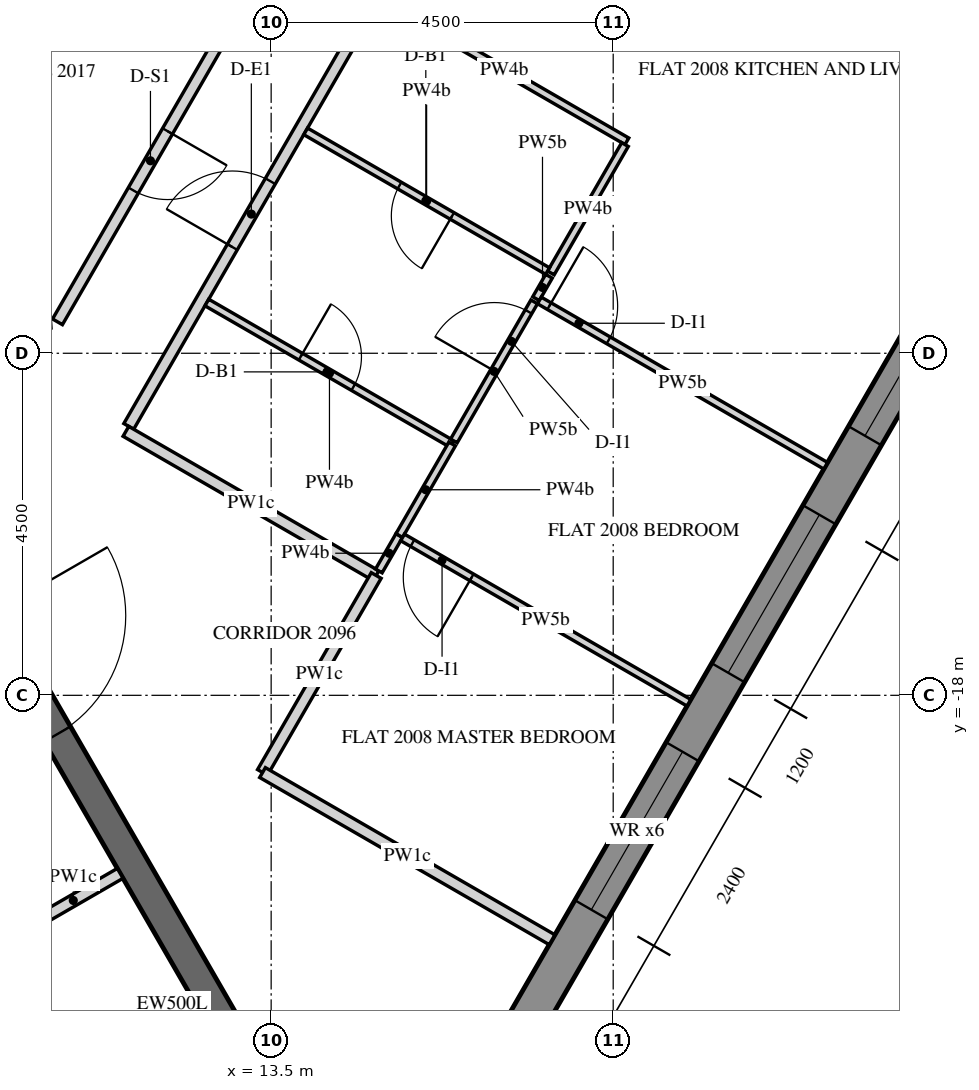
"""IFC4 building model, lengths in metres.
Left out: names, types, materials, properties, quantities, classifications, styles, units other than length and angle.
Written with IfcOpenShell. Run it as: python <this file> out.ifc"""

import sys

from ifc_helpers import new_model, si_unit, direction, frame, frame_2d, origin, place, context, subcontext, project, spatial, polyline, rectangle, outline, extrude, element, fill, save


model = new_model("IFC4")
c1 = context("Model", 3, precision=1e-05, world=origin(), true_north=direction((0.0, 1.0)))
c2 = subcontext(c1, "Body", "Model", "MODEL_VIEW")
j1 = project(units=[si_unit("LENGTHUNIT", "METRE"), si_unit("PLANEANGLEUNIT", "RADIAN")], contexts=[c1])
p1 = place(None, origin())
s1 = spatial("IfcSite", under=j1, at=p1, CompositionType="ELEMENT")
p2 = place(p1, origin())
s2 = spatial("IfcBuilding", under=s1, at=p2, CompositionType="ELEMENT")
p3 = place(p2, frame((0.0, 0.0, 260.1)))
s3 = spatial("IfcBuildingStorey", under=s2, at=p3, CompositionType="ELEMENT", Elevation=260.1)
p4 = place(p3, frame((16.451, -23.005, -0.15), z_axis=(0.0, 0.0, 1.0), x_axis=(0.500003737743, 0.866023245787, 0.0)))
e1 = element("IfcWall", 1, at=p4, inside=s3, PredefinedType="SOLIDWALL", context=c2, shape_type="SweptSolid", body=[
    extrude(outline(polyline([(-0.021, -0.25), (25.468, -0.25), (25.421, 0.25), (0.021, 0.25), (-0.021, -0.25)])), origin(), (0.0, 0.0, 1.0), 3.9),
])
p5 = place(p4, frame((2.522, 0.0, 0.75)))
e2 = element("IfcOpeningElement", 2, at=p5, cuts=e1, PredefinedType="OPENING", context=c2, shape_type="SweptSolid", body=[
    extrude(rectangle(XDim=2.4, YDim=2.7, at=frame_2d((1.2, 1.35))), frame((0.0, 0.26, 0.0), z_axis=(0.0, -1.0, 0.0), x_axis=(1.0, 0.0, 0.0)), (0.0, 0.0, 1.0), 0.52),
])
p6 = place(p4, frame((6.122, 0.0, 0.75)))
e3 = element("IfcOpeningElement", 3, at=p6, cuts=e1, PredefinedType="OPENING", context=c2, shape_type="SweptSolid", body=[
    extrude(rectangle(XDim=2.4, YDim=2.7, at=frame_2d((1.2, 1.35))), frame((0.0, 0.26, 0.0), z_axis=(0.0, -1.0, 0.0), x_axis=(1.0, 0.0, 0.0)), (0.0, 0.0, 1.0), 0.52),
])
p7 = place(p4, frame((9.722, 0.0, 0.75)))
e4 = element("IfcOpeningElement", 4, at=p7, cuts=e1, PredefinedType="OPENING", context=c2, shape_type="SweptSolid", body=[
    extrude(rectangle(XDim=2.4, YDim=2.7, at=frame_2d((1.2, 1.35))), frame((0.0, 0.26, 0.0), z_axis=(0.0, -1.0, 0.0), x_axis=(1.0, 0.0, 0.0)), (0.0, 0.0, 1.0), 0.52),
])
p8 = place(p4, frame((13.323, 0.0, 0.75)))
e5 = element("IfcOpeningElement", 5, at=p8, cuts=e1, PredefinedType="OPENING", context=c2, shape_type="SweptSolid", body=[
    extrude(rectangle(XDim=2.4, YDim=2.7, at=frame_2d((1.2, 1.35))), frame((0.0, 0.26, 0.0), z_axis=(0.0, -1.0, 0.0), x_axis=(1.0, 0.0, 0.0)), (0.0, 0.0, 1.0), 0.52),
])
p9 = place(p4, frame((16.922, 0.0, 0.75)))
e6 = element("IfcOpeningElement", 6, at=p9, cuts=e1, PredefinedType="OPENING", context=c2, shape_type="SweptSolid", body=[
    extrude(rectangle(XDim=2.4, YDim=2.7, at=frame_2d((1.2, 1.35))), frame((0.0, 0.26, 0.0), z_axis=(0.0, -1.0, 0.0), x_axis=(1.0, 0.0, 0.0)), (0.0, 0.0, 1.0), 0.52),
])
p10 = place(p4, frame((20.522, 0.0, 0.75)))
e7 = element("IfcOpeningElement", 7, at=p10, cuts=e1, PredefinedType="OPENING", context=c2, shape_type="SweptSolid", body=[
    extrude(rectangle(XDim=2.4, YDim=2.7, at=frame_2d((1.2, 1.35))), frame((0.0, 0.26, 0.0), z_axis=(0.0, -1.0, 0.0), x_axis=(1.0, 0.0, 0.0)), (0.0, 0.0, 1.0), 0.52),
])
p11 = place(p3, frame((6.235, -10.8, -0.15), z_axis=(0.0, 0.0, 1.0), x_axis=(0.499996419489, 0.866027470984, 0.0)))
e8 = element("IfcWall", 8, at=p11, inside=s3, PredefinedType="SHEAR", context=c2, shape_type="SweptSolid", body=[
    extrude(outline(polyline([(-0.115, -0.2), (12.586, -0.2), (12.355, 0.2), (0.115, 0.2), (-0.115, -0.2)])), origin(), (0.0, 0.0, 1.0), 3.9),
])
p12 = place(p11, frame((5.364, 0.0, 0.15)))
e9 = element("IfcOpeningElement", 9, at=p12, cuts=e8, PredefinedType="OPENING", context=c2, shape_type="SweptSolid", body=[
    extrude(rectangle(XDim=1.8, YDim=2.4, at=frame_2d((0.9, 1.2))), frame((0.0, 0.21, 0.0), z_axis=(0.0, -1.0, 0.0), x_axis=(1.0, 0.0, 0.0)), (0.0, 0.0, 1.0), 0.42),
])
p13 = place(p3, frame((6.351, -11.0, -0.15), z_axis=(0.0, 0.0, 1.0), x_axis=(0.499998894578, -0.866026041999, 0.0)))
e10 = element("IfcWall", 10, at=p13, inside=s3, PredefinedType="SHEAR", context=c2, shape_type="SweptSolid", body=[
    extrude(rectangle(XDim=15.544, YDim=0.4, at=frame_2d((7.772, 0.0))), origin(), (0.0, 0.0, 1.0), 3.9),
])
p14 = place(p13, frame((6.872, 0.0, 0.15)))
e11 = element("IfcOpeningElement", 11, at=p14, cuts=e10, PredefinedType="OPENING", context=c2, shape_type="SweptSolid", body=[
    extrude(rectangle(XDim=1.8, YDim=2.4, at=frame_2d((0.9, 1.2))), frame((0.0, 0.21, 0.0), z_axis=(0.0, -1.0, 0.0), x_axis=(1.0, 0.0, 0.0)), (0.0, 0.0, 1.0), 0.42),
])
p15 = place(p3, frame((10.28, -21.055, 0.0), z_axis=(0.0, 0.0, 1.0), x_axis=(0.866020080793, 0.500009219579, 0.0)))
e12 = element("IfcWall", 12, at=p15, inside=s3, PredefinedType="PARTITIONING", context=c2, shape_type="SweptSolid", body=[
    extrude(rectangle(XDim=1.425, YDim=0.15, at=frame_2d((0.712, 0.0))), origin(), (0.0, 0.0, 1.0), 2.823),
])
p16 = place(p3, frame((11.627, -14.462, 0.0), z_axis=(0.0, 0.0, 1.0), x_axis=(0.499994634027, 0.866028501808, 0.0)))
e13 = element("IfcWall", 13, at=p16, inside=s3, PredefinedType="PARTITIONING", context=c2, shape_type="SweptSolid", body=[
    extrude(rectangle(XDim=15.296, YDim=0.15, at=frame_2d((7.648, 0.0))), origin(), (0.0, 0.0, 1.0), 2.823),
])
p17 = place(p16, frame((2.725, 0.0, 0.0)))
e14 = element("IfcOpeningElement", 14, at=p17, cuts=e13, PredefinedType="OPENING", context=c2, shape_type="SweptSolid", body=[
    extrude(rectangle(XDim=1.0, YDim=2.1, at=frame_2d((0.5, 1.05))), frame((0.0, 0.085, 0.0), z_axis=(0.0, -1.0, 0.0), x_axis=(1.0, 0.0, 0.0)), (0.0, 0.0, 1.0), 0.17),
])
p18 = place(p16, frame((13.936, 0.0, 0.0)))
e15 = element("IfcOpeningElement", 15, at=p18, cuts=e13, PredefinedType="OPENING", context=c2, shape_type="SweptSolid", body=[
    extrude(rectangle(XDim=1.0, YDim=2.1, at=frame_2d((0.5, 1.05))), frame((0.0, 0.085, 0.0), z_axis=(0.0, -1.0, 0.0), x_axis=(1.0, 0.0, 0.0)), (0.0, 0.0, 1.0), 0.17),
])
p19 = place(p3, frame((14.88, -16.427, 0.0), z_axis=(0.0, 0.0, 1.0), x_axis=(-0.86601654697, 0.500015340139, 0.0)))
e16 = element("IfcWall", 16, at=p19, inside=s3, PredefinedType="PARTITIONING", context=c2, shape_type="SweptSolid", body=[
    extrude(rectangle(XDim=3.8, YDim=0.15, at=frame_2d((1.9, 0.0))), origin(), (0.0, 0.0, 1.0), 2.823),
])
p20 = place(p3, frame((13.386, -19.014, 0.0), z_axis=(0.0, 0.0, 1.0), x_axis=(0.500009728207, 0.866019787128, 0.0)))
e17 = element("IfcWall", 17, at=p20, inside=s3, PredefinedType="PARTITIONING", context=c2, shape_type="SweptSolid", body=[
    extrude(rectangle(XDim=2.992, YDim=0.15, at=frame_2d((1.496, 0.0))), origin(), (0.0, 0.0, 1.0), 2.823),
])
p21 = place(p3, frame((17.196, -21.216, 0.0), z_axis=(0.0, 0.0, 1.0), x_axis=(-0.866010893236, 0.500025132165, 0.0)))
e18 = element("IfcWall", 18, at=p21, inside=s3, PredefinedType="PARTITIONING", context=c2, shape_type="SweptSolid", body=[
    extrude(rectangle(XDim=4.399, YDim=0.15, at=frame_2d((2.199, 0.0))), origin(), (0.0, 0.0, 1.0), 2.823),
])
p22 = place(p3, frame((13.135, -8.849, 0.0), z_axis=(0.0, 0.0, 1.0), x_axis=(-0.500024829938, -0.866011067739, 0.0)))
e19 = element("IfcWall", 19, at=p22, inside=s3, PredefinedType="PARTITIONING", context=c2, shape_type="SweptSolid", body=[
    extrude(rectangle(XDim=4.892, YDim=0.15, at=frame_2d((2.446, 0.0))), origin(), (0.0, 0.0, 1.0), 2.823),
])
p23 = place(p22, frame((1.996, 0.0, 0.0)))
e20 = element("IfcOpeningElement", 20, at=p23, cuts=e19, PredefinedType="OPENING", context=c2, shape_type="SweptSolid", body=[
    extrude(rectangle(XDim=0.9, YDim=2.1, at=frame_2d((0.45, 1.05))), frame((0.0, 0.085, 0.0), z_axis=(0.0, -1.0, 0.0), x_axis=(1.0, 0.0, 0.0)), (0.0, 0.0, 1.0), 0.17),
])
p24 = place(p3, frame((17.155, -12.487, 0.0), z_axis=(0.0, 0.0, 1.0), x_axis=(-0.499681137129, -0.866209421097, 0.0)))
e21 = element("IfcWall", 21, at=p24, inside=s3, PredefinedType="PARTITIONING", context=c2, shape_type="SweptSolid", body=[
    extrude(rectangle(XDim=0.341, YDim=0.1, at=frame_2d((0.17, 0.0))), origin(), (0.0, 0.0, 1.0), 2.823),
])
p25 = place(p3, frame((17.029, -12.805, 0.0), z_axis=(0.0, 0.0, 1.0), x_axis=(0.866027639635, -0.499996127374, 0.0)))
e22 = element("IfcWall", 22, at=p25, inside=s3, PredefinedType="PARTITIONING", context=c2, shape_type="SweptSolid", body=[
    extrude(rectangle(XDim=4.35, YDim=0.1, at=frame_2d((2.175, 0.0))), origin(), (0.0, 0.0, 1.0), 2.823),
])
p26 = place(p25, frame((0.15, 0.0, 0.0)))
e23 = element("IfcOpeningElement", 23, at=p26, cuts=e22, PredefinedType="OPENING", context=c2, shape_type="SweptSolid", body=[
    extrude(rectangle(XDim=0.9, YDim=2.1, at=frame_2d((0.45, 1.05))), frame((0.0, 0.06, 0.0), z_axis=(0.0, -1.0, 0.0), x_axis=(1.0, 0.0, 0.0)), (0.0, 0.0, 1.0), 0.12),
])
p27 = place(p3, frame((14.954, -8.849, 0.0), z_axis=(0.0, 0.0, 1.0), x_axis=(0.866028424924, -0.499994767197, 0.0)))
e24 = element("IfcWall", 24, at=p27, inside=s3, PredefinedType="PARTITIONING", context=c2, shape_type="SweptSolid", body=[
    extrude(rectangle(XDim=3.725, YDim=0.1, at=frame_2d((1.863, 0.0))), origin(), (0.0, 0.0, 1.0), 2.823),
])
p28 = place(p3, frame((18.155, -10.754, 0.0), z_axis=(0.0, 0.0, 1.0), x_axis=(-0.49989585183, -0.866085525409, 0.0)))
e25 = element("IfcWall", 25, at=p28, inside=s3, PredefinedType="PARTITIONING", context=c2, shape_type="SweptSolid", body=[
    extrude(rectangle(XDim=1.95, YDim=0.1, at=frame_2d((0.975, 0.0))), origin(), (0.0, 0.0, 1.0), 2.823),
])
p29 = place(p3, frame((12.654, -12.833, 0.0), z_axis=(0.0, 0.0, 1.0), x_axis=(0.866056803351, -0.499945610411, 0.0)))
e26 = element("IfcWall", 26, at=p29, inside=s3, PredefinedType="PARTITIONING", context=c2, shape_type="SweptSolid", body=[
    extrude(rectangle(XDim=3.725, YDim=0.1, at=frame_2d((1.863, 0.0))), origin(), (0.0, 0.0, 1.0), 2.823),
])
p30 = place(p29, frame((1.425, 0.0, 0.0)))
e27 = element("IfcOpeningElement", 27, at=p30, cuts=e26, PredefinedType="OPENING", context=c2, shape_type="SweptSolid", body=[
    extrude(rectangle(XDim=0.8, YDim=2.1, at=frame_2d((0.4, 1.05))), frame((0.0, 0.06, 0.0), z_axis=(0.0, -1.0, 0.0), x_axis=(1.0, 0.0, 0.0)), (0.0, 0.0, 1.0), 0.12),
])
p31 = place(p3, frame((15.904, -14.653, 0.0), z_axis=(0.0, 0.0, 1.0), x_axis=(0.499979177903, 0.866037425094, 0.0)))
e28 = element("IfcWall", 28, at=p31, inside=s3, PredefinedType="PARTITIONING", context=c2, shape_type="SweptSolid", body=[
    extrude(rectangle(XDim=2.113, YDim=0.1, at=frame_2d((1.056, 0.0))), origin(), (0.0, 0.0, 1.0), 2.823),
])
p32 = place(p31, frame((1.063, 0.0, 0.0)))
e29 = element("IfcOpeningElement", 29, at=p32, cuts=e28, PredefinedType="OPENING", context=c2, shape_type="SweptSolid", body=[
    extrude(rectangle(XDim=0.9, YDim=2.1, at=frame_2d((0.45, 1.05))), frame((0.0, 0.06, 0.0), z_axis=(0.0, -1.0, 0.0), x_axis=(1.0, 0.0, 0.0)), (0.0, 0.0, 1.0), 0.12),
])
p33 = place(p3, frame((17.137, -12.418, 0.0), z_axis=(0.0, 0.0, 1.0), x_axis=(-0.866035129944, 0.499983153418, 0.0)))
e30 = element("IfcWall", 30, at=p33, inside=s3, PredefinedType="PARTITIONING", context=c2, shape_type="SweptSolid", body=[
    extrude(rectangle(XDim=3.675, YDim=0.1, at=frame_2d((1.837, 0.0))), origin(), (0.0, 0.0, 1.0), 2.823),
])
p34 = place(p33, frame((1.45, 0.0, 0.0)))
e31 = element("IfcOpeningElement", 31, at=p34, cuts=e30, PredefinedType="OPENING", context=c2, shape_type="SweptSolid", body=[
    extrude(rectangle(XDim=0.8, YDim=2.1, at=frame_2d((0.4, 1.05))), frame((0.0, 0.06, 0.0), z_axis=(0.0, -1.0, 0.0), x_axis=(1.0, 0.0, 0.0)), (0.0, 0.0, 1.0), 0.12),
])
p35 = place(p3, frame((14.917, -16.364, 0.0), z_axis=(0.0, 0.0, 1.0), x_axis=(0.500141487433, 0.865943700565, 0.0)))
e32 = element("IfcWall", 32, at=p35, inside=s3, PredefinedType="PARTITIONING", context=c2, shape_type="SweptSolid", body=[
    extrude(rectangle(XDim=0.538, YDim=0.1, at=frame_2d((0.269, 0.0))), origin(), (0.0, 0.0, 1.0), 2.823),
])
p36 = place(p3, frame((15.186, -15.898, 0.0), z_axis=(0.0, 0.0, 1.0), x_axis=(0.4999705729, 0.866042392862, 0.0)))
e33 = element("IfcWall", 33, at=p36, inside=s3, PredefinedType="PARTITIONING", context=c2, shape_type="SweptSolid", body=[
    extrude(rectangle(XDim=1.391, YDim=0.1, at=frame_2d((0.696, 0.0))), origin(), (0.0, 0.0, 1.0), 2.823),
])
p37 = place(p3, frame((18.996, -18.098, 0.0), z_axis=(0.0, 0.0, 1.0), x_axis=(-0.866027639635, 0.499996127374, 0.0)))
e34 = element("IfcWall", 34, at=p37, inside=s3, PredefinedType="PARTITIONING", context=c2, shape_type="SweptSolid", body=[
    extrude(rectangle(XDim=4.35, YDim=0.1, at=frame_2d((2.175, 0.0))), origin(), (0.0, 0.0, 1.0), 2.823),
])
p38 = place(p37, frame((3.3, 0.0, 0.0)))
e35 = element("IfcOpeningElement", 35, at=p38, cuts=e34, PredefinedType="OPENING", context=c2, shape_type="SweptSolid", body=[
    extrude(rectangle(XDim=0.9, YDim=2.1, at=frame_2d((0.45, 1.05))), frame((0.0, 0.06, 0.0), z_axis=(0.0, -1.0, 0.0), x_axis=(1.0, 0.0, 0.0)), (0.0, 0.0, 1.0), 0.12),
])
p39 = place(p5, frame((0.0, 0.18, 0.0)))
e36 = element("IfcWindow", 36, at=p39, inside=s3, PartitioningType="DOUBLE_PANEL_VERTICAL", PredefinedType="WINDOW", context=c2, shape_type="SweptSolid", body=[
    extrude(rectangle(XDim=2.4, YDim=2.7, at=frame_2d((1.2, 1.35))), frame((0.0, 0.03, 0.0), z_axis=(0.0, -1.0, 0.0), x_axis=(1.0, 0.0, 0.0)), (0.0, 0.0, 1.0), 0.06),
])
fill(e2, e36)
p40 = place(p6, frame((0.0, 0.18, 0.0)))
e37 = element("IfcWindow", 37, at=p40, inside=s3, PartitioningType="DOUBLE_PANEL_VERTICAL", PredefinedType="WINDOW", context=c2, shape_type="SweptSolid", body=[
    extrude(rectangle(XDim=2.4, YDim=2.7, at=frame_2d((1.2, 1.35))), frame((0.0, 0.03, 0.0), z_axis=(0.0, -1.0, 0.0), x_axis=(1.0, 0.0, 0.0)), (0.0, 0.0, 1.0), 0.06),
])
fill(e3, e37)
p41 = place(p7, frame((0.0, 0.18, 0.0)))
e38 = element("IfcWindow", 38, at=p41, inside=s3, PartitioningType="DOUBLE_PANEL_VERTICAL", PredefinedType="WINDOW", context=c2, shape_type="SweptSolid", body=[
    extrude(rectangle(XDim=2.4, YDim=2.7, at=frame_2d((1.2, 1.35))), frame((0.0, 0.03, 0.0), z_axis=(0.0, -1.0, 0.0), x_axis=(1.0, 0.0, 0.0)), (0.0, 0.0, 1.0), 0.06),
])
fill(e4, e38)
p42 = place(p14, origin())
e39 = element("IfcDoor", 39, at=p42, inside=s3, OperationType="DOUBLE_DOOR_SINGLE_SWING", PredefinedType="DOOR", context=c2, shape_type="SweptSolid", body=[
    extrude(rectangle(XDim=1.8, YDim=2.4, at=frame_2d((0.9, 1.2))), frame((0.0, 0.025, 0.0), z_axis=(0.0, -1.0, 0.0), x_axis=(1.0, 0.0, 0.0)), (0.0, 0.0, 1.0), 0.05),
])
fill(e11, e39)
p43 = place(p17, origin())
e40 = element("IfcDoor", 40, at=p43, inside=s3, OperationType="SINGLE_SWING_LEFT", PredefinedType="DOOR", context=c2, shape_type="SweptSolid", body=[
    extrude(rectangle(XDim=1.0, YDim=2.1, at=frame_2d((0.5, 1.05))), frame((0.0, 0.025, 0.0), z_axis=(0.0, -1.0, 0.0), x_axis=(1.0, 0.0, 0.0)), (0.0, 0.0, 1.0), 0.05),
])
fill(e14, e40)
p44 = place(p30, origin())
e41 = element("IfcDoor", 41, at=p44, inside=s3, OperationType="SINGLE_SWING_RIGHT", PredefinedType="DOOR", context=c2, shape_type="SweptSolid", body=[
    extrude(rectangle(XDim=0.8, YDim=2.1, at=frame_2d((0.4, 1.05))), frame((0.0, 0.025, 0.0), z_axis=(0.0, -1.0, 0.0), x_axis=(1.0, 0.0, 0.0)), (0.0, 0.0, 1.0), 0.05),
])
fill(e27, e41)
p45 = place(p32, origin())
e42 = element("IfcDoor", 42, at=p45, inside=s3, OperationType="SINGLE_SWING_RIGHT", PredefinedType="DOOR", context=c2, shape_type="SweptSolid", body=[
    extrude(rectangle(XDim=0.9, YDim=2.1, at=frame_2d((0.45, 1.05))), frame((0.0, 0.025, 0.0), z_axis=(0.0, -1.0, 0.0), x_axis=(1.0, 0.0, 0.0)), (0.0, 0.0, 1.0), 0.05),
])
fill(e29, e42)
p46 = place(p38, origin())
e43 = element("IfcDoor", 43, at=p46, inside=s3, OperationType="SINGLE_SWING_RIGHT", PredefinedType="DOOR", context=c2, shape_type="SweptSolid", body=[
    extrude(rectangle(XDim=0.9, YDim=2.1, at=frame_2d((0.45, 1.05))), frame((0.0, 0.025, 0.0), z_axis=(0.0, -1.0, 0.0), x_axis=(1.0, 0.0, 0.0)), (0.0, 0.0, 1.0), 0.05),
])
fill(e35, e43)
p47 = place(p26, origin())
e44 = element("IfcDoor", 44, at=p47, inside=s3, OperationType="SINGLE_SWING_RIGHT", PredefinedType="DOOR", context=c2, shape_type="SweptSolid", body=[
    extrude(rectangle(XDim=0.9, YDim=2.1, at=frame_2d((0.45, 1.05))), frame((0.0, 0.025, 0.0), z_axis=(0.0, -1.0, 0.0), x_axis=(1.0, 0.0, 0.0)), (0.0, 0.0, 1.0), 0.05),
])
fill(e23, e44)
p48 = place(p34, origin())
e45 = element("IfcDoor", 45, at=p48, inside=s3, OperationType="SINGLE_SWING_RIGHT", PredefinedType="DOOR", context=c2, shape_type="SweptSolid", body=[
    extrude(rectangle(XDim=0.8, YDim=2.1, at=frame_2d((0.4, 1.05))), frame((0.0, 0.025, 0.0), z_axis=(0.0, -1.0, 0.0), x_axis=(1.0, 0.0, 0.0)), (0.0, 0.0, 1.0), 0.05),
])
fill(e31, e45)
p49 = place(p23, origin())
e46 = element("IfcDoor", 46, at=p49, inside=s3, OperationType="SINGLE_SWING_LEFT", PredefinedType="DOOR", context=c2, shape_type="SweptSolid", body=[
    extrude(rectangle(XDim=0.9, YDim=2.1, at=frame_2d((0.45, 1.05))), frame((0.0, 0.025, 0.0), z_axis=(0.0, -1.0, 0.0), x_axis=(1.0, 0.0, 0.0)), (0.0, 0.0, 1.0), 0.05),
])
fill(e20, e46)
save(model, sys.argv[1])
